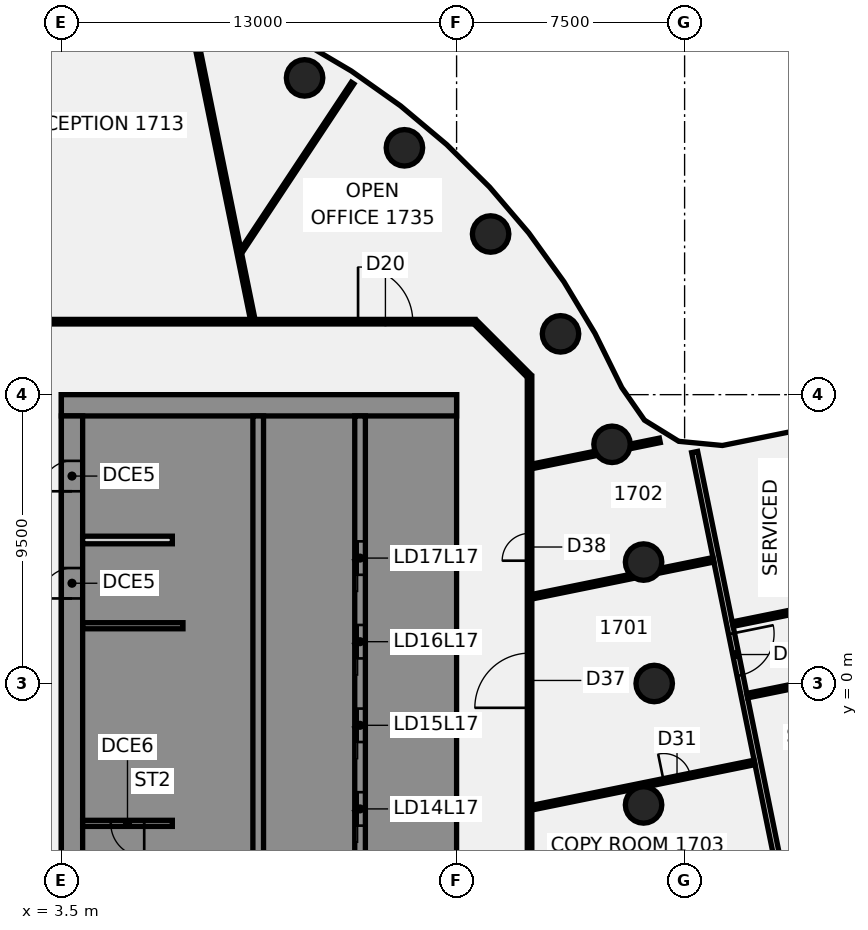
"""IFC4 building model, lengths in metres.
Left out: names, types, materials, properties, quantities, classifications, styles, units other than length and angle.
Written with IfcOpenShell. Run it as: python <this file> out.ifc"""

import sys

from ifc_helpers import new_model, si_unit, direction, frame, frame_2d, origin, origin_2d, place, context, subcontext, project, spatial, polyline, rectangle, circle, outline, extrude, element, fill, save


model = new_model("IFC4")
c1 = context("Model", 3, precision=1e-05, world=origin(), true_north=direction((0.0, 1.0)))
c2 = subcontext(c1, "Body", "Model", "MODEL_VIEW")
j1 = project(units=[si_unit("LENGTHUNIT", "METRE"), si_unit("PLANEANGLEUNIT", "RADIAN")], contexts=[c1])
p1 = place(None, origin())
s1 = spatial("IfcSite", under=j1, at=p1, CompositionType="ELEMENT")
p2 = place(p1, origin())
s2 = spatial("IfcBuilding", under=s1, at=p2, CompositionType="ELEMENT")
p3 = place(p2, frame((0.0, 0.0, 75.25)))
s3 = spatial("IfcBuildingStorey", under=s2, at=p3, CompositionType="ELEMENT", Elevation=75.25)
for number, where, z_axis, x_axis in (
    (1, (23.0, 0.0, -0.14), (0.0, 0.0, 1.0), (1.0, 0.0, 0.0)),
    (2, (22.651, 3.994, -0.14), (0.0, 0.0, 1.0), (1.0, 0.0, 0.0)),
    (3, (21.613, 7.866, -0.14), (0.0, 0.0, 1.0), (1.0, 0.0, 0.0)),
    (4, (19.919, 11.5, -0.14), (0.0, 0.0, 1.0), (1.0, 0.0, 0.0)),
    (5, (17.619, 14.784, -0.14), (0.0, 0.0, 1.0), (1.0, 0.0, 0.0)),
    (6, (14.784, 17.619, -0.14), (0.0, 0.0, 1.0), (1.0, 0.0, 0.0)),
    (7, (11.5, 19.919, -0.14), (0.0, 0.0, 1.0), (1.0, 0.0, 0.0)),
    (8, (22.651, -3.994, -0.14), (0.0, 0.0, 1.0), (1.0, 0.0, 0.0)),
):
    element("IfcColumn", number, at=place(p3, frame(where, z_axis=z_axis, x_axis=x_axis)), inside=s3, PredefinedType="COLUMN", context=c2, shape_type="SweptSolid", body=[
        extrude(circle(Radius=0.6, at=origin_2d()), origin(), (0.0, 0.0, 1.0), 3.71),
    ])
p4 = place(p3, frame((7.954, 21.026, 0.0), z_axis=(0.0, 0.0, 1.0), x_axis=(0.19921022079, -0.979956778604, 0.0)))
e9 = element("IfcWall", 9, at=p4, inside=s3, PredefinedType="PARTITIONING", context=c2, shape_type="SweptSolid", body=[
    extrude(rectangle(XDim=9.238, YDim=0.15, at=frame_2d((4.619, 0.0))), origin(), (0.0, 0.0, 1.0), 2.97),
])
p5 = place(p3, frame((24.33, 7.613, 0.0), z_axis=(0.0, 0.0, 1.0), x_axis=(0.199070356953, -0.97998520039, 0.0)))
e10 = element("IfcWall", 10, at=p5, inside=s3, PredefinedType="PARTITIONING", context=c2, shape_type="SweptSolid", body=[
    extrude(rectangle(XDim=13.695, YDim=0.2, at=frame_2d((6.848, 0.0))), origin(), (0.0, 0.0, 1.0), 2.87),
])
p6 = place(p5, frame((6.096, 0.0, 0.0)))
e11 = element("IfcOpeningElement", 11, at=p6, cuts=e10, PredefinedType="OPENING", context=c2, shape_type="SweptSolid", body=[
    extrude(rectangle(XDim=1.4, YDim=2.1, at=frame_2d((0.7, 1.05))), frame((0.0, 0.11, 0.0), z_axis=(0.0, -1.0, 0.0), x_axis=(1.0, 0.0, 0.0)), (0.0, 0.0, 1.0), 0.22),
])
p7 = place(p3, frame((17.128, 11.872, 0.0), z_axis=(0.0, 0.0, 1.0), x_axis=(0.707106781187, -0.707106781187, 0.0)))
e12 = element("IfcWall", 12, at=p7, inside=s3, PredefinedType="PARTITIONING", context=c2, shape_type="SweptSolid", body=[
    extrude(rectangle(XDim=2.465, YDim=0.15, at=frame_2d((1.232, 0.0))), origin(), (0.0, 0.0, 1.0), 2.97),
])
p8 = place(p3, frame((-17.065, 11.9, 0.0), z_axis=(0.0, 0.0, 1.0), x_axis=(1.0, 0.0, 0.0)))
e13 = element("IfcWall", 13, at=p8, inside=s3, PredefinedType="PARTITIONING", context=c2, shape_type="SweptSolid", body=[
    extrude(rectangle(XDim=34.165, YDim=0.15, at=frame_2d((17.083, 0.0))), origin(), (0.0, 0.0, 1.0), 2.97),
])
p9 = place(p8, frame((18.263, 0.0, 0.0)))
e14 = element("IfcOpeningElement", 14, at=p9, cuts=e13, PredefinedType="OPENING", context=c2, shape_type="SweptSolid", body=[
    extrude(rectangle(XDim=1.8, YDim=2.1, at=frame_2d((0.9, 1.05))), frame((0.0, 0.085, 0.0), z_axis=(0.0, -1.0, 0.0), x_axis=(1.0, 0.0, 0.0)), (0.0, 0.0, 1.0), 0.17),
])
p10 = place(p8, frame((30.324, 0.0, 0.0)))
e15 = element("IfcOpeningElement", 15, at=p10, cuts=e13, PredefinedType="OPENING", context=c2, shape_type="SweptSolid", body=[
    extrude(rectangle(XDim=1.8, YDim=2.1, at=frame_2d((0.9, 1.05))), frame((0.0, 0.085, 0.0), z_axis=(0.0, -1.0, 0.0), x_axis=(1.0, 0.0, 0.0)), (0.0, 0.0, 1.0), 0.17),
])
p11 = place(p8, frame((4.765, 0.0, 0.0)))
e16 = element("IfcOpeningElement", 16, at=p11, cuts=e13, PredefinedType="OPENING", context=c2, shape_type="SweptSolid", body=[
    extrude(rectangle(XDim=1.8, YDim=2.1, at=frame_2d((0.9, 1.05))), frame((0.0, 0.085, 0.0), z_axis=(0.0, -1.0, 0.0), x_axis=(1.0, 0.0, 0.0)), (0.0, 0.0, 1.0), 0.17),
])
p12 = place(p3, frame((18.973, -4.085, 0.0), z_axis=(0.0, 0.0, 1.0), x_axis=(0.979950067583, 0.19924323086, 0.0)))
e17 = element("IfcWall", 17, at=p12, inside=s3, PredefinedType="PARTITIONING", context=c2, shape_type="SweptSolid", body=[
    extrude(rectangle(XDim=7.475, YDim=0.15, at=frame_2d((3.737, 0.0))), origin(), (0.0, 0.0, 1.0), 2.87),
])
p13 = place(p12, frame((4.425, 0.0, 0.0)))
e18 = element("IfcOpeningElement", 18, at=p13, cuts=e17, PredefinedType="OPENING", context=c2, shape_type="SweptSolid", body=[
    extrude(rectangle(XDim=0.9, YDim=2.1, at=frame_2d((0.45, 1.05))), frame((0.0, 0.085, 0.0), z_axis=(0.0, -1.0, 0.0), x_axis=(1.0, 0.0, 0.0)), (0.0, 0.0, 1.0), 0.17),
])
p14 = place(p3, frame((18.973, 2.854, 0.0), z_axis=(0.0, 0.0, 1.0), x_axis=(0.979950296152, 0.199242106673, 0.0)))
e19 = element("IfcWall", 19, at=p14, inside=s3, PredefinedType="PARTITIONING", context=c2, shape_type="SweptSolid", body=[
    extrude(rectangle(XDim=3.378, YDim=0.15, at=frame_2d((1.689, 0.0))), origin(), (0.0, 0.0, 1.0), 2.97),
])
p15 = place(p3, frame((23.185, 3.71, 0.0), z_axis=(0.0, 0.0, 1.0), x_axis=(0.979938907772, 0.199298110967, 0.0)))
e20 = element("IfcWall", 20, at=p15, inside=s3, PredefinedType="PARTITIONING", context=c2, shape_type="SweptSolid", body=[
    extrude(rectangle(XDim=1.8, YDim=0.15, at=frame_2d((0.9, 0.0))), origin(), (0.0, 0.0, 1.0), 2.87),
])
p16 = place(p3, frame((25.583, 1.953, 0.0), z_axis=(0.0, 0.0, 1.0), x_axis=(0.979952528363, 0.199231127477, 0.0)))
e21 = element("IfcWall", 21, at=p16, inside=s3, PredefinedType="PARTITIONING", context=c2, shape_type="SweptSolid", body=[
    extrude(rectangle(XDim=17.825, YDim=0.15, at=frame_2d((8.913, 0.0))), origin(), (0.0, 0.0, 1.0), 2.87),
])
p17 = place(p16, frame((5.15, 0.0, 0.0)))
e22 = element("IfcOpeningElement", 22, at=p17, cuts=e21, PredefinedType="OPENING", context=c2, shape_type="SweptSolid", body=[
    extrude(rectangle(XDim=0.9, YDim=2.1, at=frame_2d((0.45, 1.05))), frame((0.0, 0.085, 0.0), z_axis=(0.0, -1.0, 0.0), x_axis=(1.0, 0.0, 0.0)), (0.0, 0.0, 1.0), 0.17),
])
p18 = place(p16, frame((11.75, 0.0, 0.0)))
e23 = element("IfcOpeningElement", 23, at=p18, cuts=e21, PredefinedType="OPENING", context=c2, shape_type="SweptSolid", body=[
    extrude(rectangle(XDim=0.9, YDim=2.1, at=frame_2d((0.45, 1.05))), frame((0.0, 0.085, 0.0), z_axis=(0.0, -1.0, 0.0), x_axis=(1.0, 0.0, 0.0)), (0.0, 0.0, 1.0), 0.17),
])
p19 = place(p3, frame((26.061, -0.399, 0.0), z_axis=(0.0, 0.0, 1.0), x_axis=(0.979938127912, 0.199301945462, 0.0)))
e24 = element("IfcWall", 24, at=p19, inside=s3, PredefinedType="PARTITIONING", context=c2, shape_type="SweptSolid", body=[
    extrude(rectangle(XDim=3.86, YDim=0.15, at=frame_2d((1.93, 0.0))), origin(), (0.0, 0.0, 1.0), 2.87),
])
p20 = place(p3, frame((18.973, 7.14, 0.0), z_axis=(0.0, 0.0, 1.0), x_axis=(0.979916380724, 0.199408843305, 0.0)))
e25 = element("IfcWall", 25, at=p20, inside=s3, PredefinedType="PARTITIONING", context=c2, shape_type="SweptSolid", body=[
    extrude(rectangle(XDim=2.152, YDim=0.15, at=frame_2d((1.076, 0.0))), origin(), (0.0, 0.0, 1.0), 2.97),
])
p21 = place(p3, frame((22.204, 7.797, 0.0), z_axis=(0.0, 0.0, 1.0), x_axis=(0.979965738982, 0.199166137736, 0.0)))
e26 = element("IfcWall", 26, at=p21, inside=s3, PredefinedType="PARTITIONING", context=c2, shape_type="SweptSolid", body=[
    extrude(rectangle(XDim=1.0, YDim=0.15, at=frame_2d((0.5, 0.0))), origin(), (0.0, 0.0, 1.0), 2.97),
])
p22 = place(p3, frame((9.431, 14.237, 0.0), z_axis=(0.0, 0.0, 1.0), x_axis=(0.552140030004, 0.833751394162, 0.0)))
e27 = element("IfcWall", 27, at=p22, inside=s3, PredefinedType="PARTITIONING", context=c2, shape_type="SweptSolid", body=[
    extrude(rectangle(XDim=6.609, YDim=0.1, at=frame_2d((3.304, 0.0))), origin(), (0.0, 0.0, 1.0), 2.97),
])
p23 = place(p3, frame((18.9, -10.1, 0.0), z_axis=(0.0, 0.0, 1.0), x_axis=(0.0, 1.0, 0.0)))
e28 = element("IfcWall", 28, at=p23, inside=s3, PredefinedType="PARTITIONING", context=c2, shape_type="SweptSolid", body=[
    extrude(rectangle(XDim=20.2, YDim=0.15, at=frame_2d((10.1, 0.0))), origin(), (0.0, 0.0, 1.0), 2.97),
])
p24 = place(p23, frame((9.3, 0.0, 0.0)))
e29 = element("IfcOpeningElement", 29, at=p24, cuts=e28, PredefinedType="OPENING", context=c2, shape_type="SweptSolid", body=[
    extrude(rectangle(XDim=1.8, YDim=2.1, at=frame_2d((0.9, 1.05))), frame((0.0, 0.085, 0.0), z_axis=(0.0, -1.0, 0.0), x_axis=(1.0, 0.0, 0.0)), (0.0, 0.0, 1.0), 0.17),
])
p25 = place(p23, frame((14.139, 0.0, 0.0)))
e30 = element("IfcOpeningElement", 30, at=p25, cuts=e28, PredefinedType="OPENING", context=c2, shape_type="SweptSolid", body=[
    extrude(rectangle(XDim=0.9, YDim=2.1, at=frame_2d((0.45, 1.05))), frame((0.0, 0.085, 0.0), z_axis=(0.0, -1.0, 0.0), x_axis=(1.0, 0.0, 0.0)), (0.0, 0.0, 1.0), 0.17),
])
p26 = place(p3, origin())
e31 = element("IfcWall", 31, at=p26, inside=s3, PredefinedType="SHEAR", context=c2, shape_type="SweptSolid", body=[
    extrude(outline(polyline([(13.5, -8.8), (15.8, -8.8), (16.5, -8.8), (16.5, 8.8), (15.8, 8.8), (13.5, 8.8), (13.5, 8.125), (15.8, 8.125), (15.8, 5.625), (13.5, 5.625), (13.5, 5.375), (15.8, 5.375), (15.8, 2.875), (13.5, 2.875), (13.5, 2.625), (15.8, 2.625), (15.8, 0.125), (13.5, 0.125), (13.5, -0.125), (15.8, -0.125), (15.8, -2.625), (13.5, -2.625), (13.5, -2.875), (15.8, -2.875), (15.8, -5.375), (13.5, -5.375), (13.5, -5.625), (15.8, -5.625), (15.8, -8.125), (13.5, -8.125), (13.5, -8.8)])), origin(), (0.0, 0.0, 1.0), 3.57),
])
p27 = place(p3, frame((16.5, 9.15, 0.0), z_axis=(0.0, 0.0, 1.0), x_axis=(-1.0, 0.0, 0.0)))
e32 = element("IfcWall", 32, at=p27, inside=s3, PredefinedType="SHEAR", context=c2, shape_type="SweptSolid", body=[
    extrude(rectangle(XDim=13.0, YDim=0.7, at=frame_2d((6.5, 0.0))), origin(), (0.0, 0.0, 1.0), 3.57),
])
p28 = place(p3, origin())
e33 = element("IfcWall", 33, at=p28, inside=s3, PredefinedType="SHEAR", context=c2, shape_type="SweptSolid", body=[
    extrude(outline(polyline([(9.8, -5.375), (7.5, -5.375), (7.5, -2.875), (9.8, -2.875), (9.8, -2.625), (7.5, -2.625), (7.5, -0.125), (9.8, -0.125), (9.8, 0.125), (7.5, 0.125), (7.5, 2.625), (9.8, 2.625), (9.8, 2.875), (7.5, 2.875), (7.5, 5.375), (9.8, 5.375), (9.8, 5.625), (7.5, 5.625), (7.5, 8.125), (9.8, 8.125), (9.8, 8.8), (7.5, 8.8), (7.15, 8.8), (7.15, -5.625), (7.5, -5.625), (9.8, -5.625), (9.8, -5.375)])), origin(), (0.0, 0.0, 1.0), 3.57),
])
p29 = place(p3, frame((7.5, 1.9, 0.0), z_axis=(0.0, 0.0, 1.0), x_axis=(-1.0, 0.0, 0.0)))
e34 = element("IfcWall", 34, at=p29, inside=s3, PredefinedType="SHEAR", context=c2, shape_type="SweptSolid", body=[
    extrude(rectangle(XDim=3.3, YDim=0.2, at=frame_2d((1.65, 0.0))), origin(), (0.0, 0.0, 1.0), 3.57),
])
p30 = place(p3, frame((13.325, -8.8, 0.0), z_axis=(0.0, 0.0, 1.0), x_axis=(0.0, 1.0, 0.0)))
e35 = element("IfcWall", 35, at=p30, inside=s3, PredefinedType="SHEAR", context=c2, shape_type="SweptSolid", body=[
    extrude(rectangle(XDim=17.6, YDim=0.35, at=frame_2d((8.8, 0.0))), origin(), (0.0, 0.0, 1.0), 3.57),
])
p31 = place(p30, frame((1.225, 0.0, 0.0)))
e36 = element("IfcOpeningElement", 36, at=p31, cuts=e35, PredefinedType="OPENING", context=c2, shape_type="SweptSolid", body=[
    extrude(rectangle(XDim=1.4, YDim=2.1, at=frame_2d((0.7, 1.05))), frame((0.0, 0.185, 0.0), z_axis=(0.0, -1.0, 0.0), x_axis=(1.0, 0.0, 0.0)), (0.0, 0.0, 1.0), 0.37),
])
p32 = place(p30, frame((4.125, 0.0, 0.0)))
e37 = element("IfcOpeningElement", 37, at=p32, cuts=e35, PredefinedType="OPENING", context=c2, shape_type="SweptSolid", body=[
    extrude(rectangle(XDim=1.1, YDim=2.1, at=frame_2d((0.55, 1.05))), frame((0.0, 0.185, 0.0), z_axis=(0.0, -1.0, 0.0), x_axis=(1.0, 0.0, 0.0)), (0.0, 0.0, 1.0), 0.37),
])
p33 = place(p30, frame((6.875, 0.0, 0.0)))
e38 = element("IfcOpeningElement", 38, at=p33, cuts=e35, PredefinedType="OPENING", context=c2, shape_type="SweptSolid", body=[
    extrude(rectangle(XDim=1.1, YDim=2.1, at=frame_2d((0.55, 1.05))), frame((0.0, 0.185, 0.0), z_axis=(0.0, -1.0, 0.0), x_axis=(1.0, 0.0, 0.0)), (0.0, 0.0, 1.0), 0.37),
])
p34 = place(p30, frame((9.625, 0.0, 0.0)))
e39 = element("IfcOpeningElement", 39, at=p34, cuts=e35, PredefinedType="OPENING", context=c2, shape_type="SweptSolid", body=[
    extrude(rectangle(XDim=1.1, YDim=2.1, at=frame_2d((0.55, 1.05))), frame((0.0, 0.185, 0.0), z_axis=(0.0, -1.0, 0.0), x_axis=(1.0, 0.0, 0.0)), (0.0, 0.0, 1.0), 0.37),
])
p35 = place(p30, frame((12.375, 0.0, 0.0)))
e40 = element("IfcOpeningElement", 40, at=p35, cuts=e35, PredefinedType="OPENING", context=c2, shape_type="SweptSolid", body=[
    extrude(rectangle(XDim=1.1, YDim=2.1, at=frame_2d((0.55, 1.05))), frame((0.0, 0.185, 0.0), z_axis=(0.0, -1.0, 0.0), x_axis=(1.0, 0.0, 0.0)), (0.0, 0.0, 1.0), 0.37),
])
p36 = place(p3, frame((9.975, -8.8, 0.0), z_axis=(0.0, 0.0, 1.0), x_axis=(0.0, 1.0, 0.0)))
e41 = element("IfcWall", 41, at=p36, inside=s3, PredefinedType="SHEAR", context=c2, shape_type="SweptSolid", body=[
    extrude(rectangle(XDim=17.6, YDim=0.35, at=frame_2d((8.8, 0.0))), origin(), (0.0, 0.0, 1.0), 3.57),
])
p37 = place(p3, frame((3.85, -8.8, 0.0), z_axis=(0.0, 0.0, 1.0), x_axis=(0.0, 1.0, 0.0)))
e42 = element("IfcWall", 42, at=p37, inside=s3, PredefinedType="SHEAR", context=c2, shape_type="SweptSolid", body=[
    extrude(rectangle(XDim=17.6, YDim=0.7, at=frame_2d((8.8, 0.0))), origin(), (0.0, 0.0, 1.0), 3.57),
])
p38 = place(p37, frame((1.15, 0.0, 0.0)))
e43 = element("IfcOpeningElement", 43, at=p38, cuts=e42, PredefinedType="OPENING", context=c2, shape_type="SweptSolid", body=[
    extrude(rectangle(XDim=1.8, YDim=2.1, at=frame_2d((0.9, 1.05))), frame((0.0, 0.36, 0.0), z_axis=(0.0, -1.0, 0.0), x_axis=(1.0, 0.0, 0.0)), (0.0, 0.0, 1.0), 0.72),
])
p39 = place(p37, frame((11.597, 0.0, 0.0)))
e44 = element("IfcOpeningElement", 44, at=p39, cuts=e42, PredefinedType="OPENING", context=c2, shape_type="SweptSolid", body=[
    extrude(rectangle(XDim=1.0, YDim=2.1, at=frame_2d((0.5, 1.05))), frame((0.0, 0.36, 0.0), z_axis=(0.0, -1.0, 0.0), x_axis=(1.0, 0.0, 0.0)), (0.0, 0.0, 1.0), 0.72),
])
p40 = place(p37, frame((15.123, 0.0, 0.0)))
e45 = element("IfcOpeningElement", 45, at=p40, cuts=e42, PredefinedType="OPENING", context=c2, shape_type="SweptSolid", body=[
    extrude(rectangle(XDim=1.0, YDim=2.1, at=frame_2d((0.5, 1.05))), frame((0.0, 0.36, 0.0), z_axis=(0.0, -1.0, 0.0), x_axis=(1.0, 0.0, 0.0)), (0.0, 0.0, 1.0), 0.72),
])
p41 = place(p3, frame((7.15, 4.72, 0.0), z_axis=(0.0, 0.0, 1.0), x_axis=(-1.0, 0.0, 0.0)))
e46 = element("IfcWall", 46, at=p41, inside=s3, PredefinedType="PARTITIONING", context=c2, shape_type="SweptSolid", body=[
    extrude(rectangle(XDim=2.95, YDim=0.25, at=frame_2d((1.475, 0.0))), origin(), (0.0, 0.0, 1.0), 3.57),
])
p42 = place(p3, frame((7.15, -4.6, 0.0), z_axis=(0.0, 0.0, 1.0), x_axis=(-1.0, 0.0, 0.0)))
e47 = element("IfcWall", 47, at=p42, inside=s3, PredefinedType="SHEAR", context=c2, shape_type="SweptSolid", body=[
    extrude(rectangle(XDim=2.95, YDim=0.2, at=frame_2d((1.475, 0.0))), origin(), (0.0, 0.0, 1.0), 3.57),
])
p43 = place(p42, frame((0.925, 0.0, 0.0)))
e48 = element("IfcOpeningElement", 48, at=p43, cuts=e47, PredefinedType="OPENING", context=c2, shape_type="SweptSolid", body=[
    extrude(rectangle(XDim=1.1, YDim=2.1, at=frame_2d((0.55, 1.05))), frame((0.0, 0.11, 0.0), z_axis=(0.0, -1.0, 0.0), x_axis=(1.0, 0.0, 0.0)), (0.0, 0.0, 1.0), 0.22),
])
p44 = place(p6, frame((1.4, 0.0, 0.0), z_axis=(0.0, 0.0, 1.0), x_axis=(-1.0, 0.0, 0.0)))
e49 = element("IfcDoor", 49, at=p44, inside=s3, OperationType="DOUBLE_DOOR_SINGLE_SWING", PredefinedType="DOOR", context=c2, shape_type="SweptSolid", body=[
    extrude(rectangle(XDim=1.4, YDim=2.1, at=frame_2d((0.7, 1.05))), frame((0.0, 0.025, 0.0), z_axis=(0.0, -1.0, 0.0), x_axis=(1.0, 0.0, 0.0)), (0.0, 0.0, 1.0), 0.05),
])
fill(e11, e49)
p45 = place(p10, origin())
e50 = element("IfcDoor", 50, at=p45, inside=s3, OperationType="DOUBLE_DOOR_SINGLE_SWING", PredefinedType="DOOR", context=c2, shape_type="SweptSolid", body=[
    extrude(rectangle(XDim=1.8, YDim=2.1, at=frame_2d((0.9, 1.05))), frame((0.0, 0.025, 0.0), z_axis=(0.0, -1.0, 0.0), x_axis=(1.0, 0.0, 0.0)), (0.0, 0.0, 1.0), 0.05),
])
fill(e15, e50)
p46 = place(p13, frame((0.9, 0.0, 0.0), z_axis=(0.0, 0.0, 1.0), x_axis=(-1.0, 0.0, 0.0)))
e51 = element("IfcDoor", 51, at=p46, inside=s3, OperationType="SINGLE_SWING_RIGHT", PredefinedType="DOOR", context=c2, shape_type="SweptSolid", body=[
    extrude(rectangle(XDim=0.9, YDim=2.1, at=frame_2d((0.45, 1.05))), frame((0.0, 0.025, 0.0), z_axis=(0.0, -1.0, 0.0), x_axis=(1.0, 0.0, 0.0)), (0.0, 0.0, 1.0), 0.05),
])
fill(e18, e51)
p47 = place(p24, origin())
e52 = element("IfcDoor", 52, at=p47, inside=s3, OperationType="DOUBLE_DOOR_SINGLE_SWING", PredefinedType="DOOR", context=c2, shape_type="SweptSolid", body=[
    extrude(rectangle(XDim=1.8, YDim=2.1, at=frame_2d((0.9, 1.05))), frame((0.0, 0.025, 0.0), z_axis=(0.0, -1.0, 0.0), x_axis=(1.0, 0.0, 0.0)), (0.0, 0.0, 1.0), 0.05),
])
fill(e29, e52)
p48 = place(p25, frame((0.9, 0.0, 0.0), z_axis=(0.0, 0.0, 1.0), x_axis=(-1.0, 0.0, 0.0)))
e53 = element("IfcDoor", 53, at=p48, inside=s3, OperationType="SINGLE_SWING_RIGHT", PredefinedType="DOOR", context=c2, shape_type="SweptSolid", body=[
    extrude(rectangle(XDim=0.9, YDim=2.1, at=frame_2d((0.45, 1.05))), frame((0.0, 0.025, 0.0), z_axis=(0.0, -1.0, 0.0), x_axis=(1.0, 0.0, 0.0)), (0.0, 0.0, 1.0), 0.05),
])
fill(e30, e53)
p49 = place(p39, origin())
e54 = element("IfcDoor", 54, at=p49, inside=s3, OperationType="SINGLE_SWING_LEFT", PredefinedType="DOOR", context=c2, shape_type="SweptSolid", body=[
    extrude(rectangle(XDim=1.0, YDim=2.1, at=frame_2d((0.5, 1.05))), frame((0.0, -0.275, 0.0), z_axis=(0.0, -1.0, 0.0), x_axis=(1.0, 0.0, 0.0)), (0.0, 0.0, 1.0), 0.05),
])
fill(e44, e54)
p50 = place(p40, origin())
e55 = element("IfcDoor", 55, at=p50, inside=s3, OperationType="SINGLE_SWING_LEFT", PredefinedType="DOOR", context=c2, shape_type="SweptSolid", body=[
    extrude(rectangle(XDim=1.0, YDim=2.1, at=frame_2d((0.5, 1.05))), frame((0.0, -0.275, 0.0), z_axis=(0.0, -1.0, 0.0), x_axis=(1.0, 0.0, 0.0)), (0.0, 0.0, 1.0), 0.05),
])
fill(e45, e55)
p51 = place(p43, origin())
e56 = element("IfcDoor", 56, at=p51, inside=s3, OperationType="SINGLE_SWING_LEFT", PredefinedType="DOOR", context=c2, shape_type="SweptSolid", body=[
    extrude(rectangle(XDim=1.1, YDim=2.1, at=frame_2d((0.55, 1.05))), frame((0.0, 0.025, 0.0), z_axis=(0.0, -1.0, 0.0), x_axis=(1.0, 0.0, 0.0)), (0.0, 0.0, 1.0), 0.05),
])
fill(e48, e56)
p52 = place(p32, origin())
e57 = element("IfcDoor", 57, at=p52, inside=s3, OperationType="SLIDING_TO_LEFT", PredefinedType="DOOR", context=c2, shape_type="SweptSolid", body=[
    extrude(rectangle(XDim=1.1, YDim=2.1, at=frame_2d((0.55, 1.05))), frame((0.0, 0.025, 0.0), z_axis=(0.0, -1.0, 0.0), x_axis=(1.0, 0.0, 0.0)), (0.0, 0.0, 1.0), 0.05),
])
fill(e37, e57)
p53 = place(p33, origin())
e58 = element("IfcDoor", 58, at=p53, inside=s3, OperationType="SLIDING_TO_LEFT", PredefinedType="DOOR", context=c2, shape_type="SweptSolid", body=[
    extrude(rectangle(XDim=1.1, YDim=2.1, at=frame_2d((0.55, 1.05))), frame((0.0, 0.025, 0.0), z_axis=(0.0, -1.0, 0.0), x_axis=(1.0, 0.0, 0.0)), (0.0, 0.0, 1.0), 0.05),
])
fill(e38, e58)
p54 = place(p34, origin())
e59 = element("IfcDoor", 59, at=p54, inside=s3, OperationType="SLIDING_TO_LEFT", PredefinedType="DOOR", context=c2, shape_type="SweptSolid", body=[
    extrude(rectangle(XDim=1.1, YDim=2.1, at=frame_2d((0.55, 1.05))), frame((0.0, 0.025, 0.0), z_axis=(0.0, -1.0, 0.0), x_axis=(1.0, 0.0, 0.0)), (0.0, 0.0, 1.0), 0.05),
])
fill(e39, e59)
p55 = place(p35, origin())
e60 = element("IfcDoor", 60, at=p55, inside=s3, OperationType="SLIDING_TO_LEFT", PredefinedType="DOOR", context=c2, shape_type="SweptSolid", body=[
    extrude(rectangle(XDim=1.1, YDim=2.1, at=frame_2d((0.55, 1.05))), frame((0.0, 0.025, 0.0), z_axis=(0.0, -1.0, 0.0), x_axis=(1.0, 0.0, 0.0)), (0.0, 0.0, 1.0), 0.05),
])
fill(e40, e60)
save(model, sys.argv[1])
